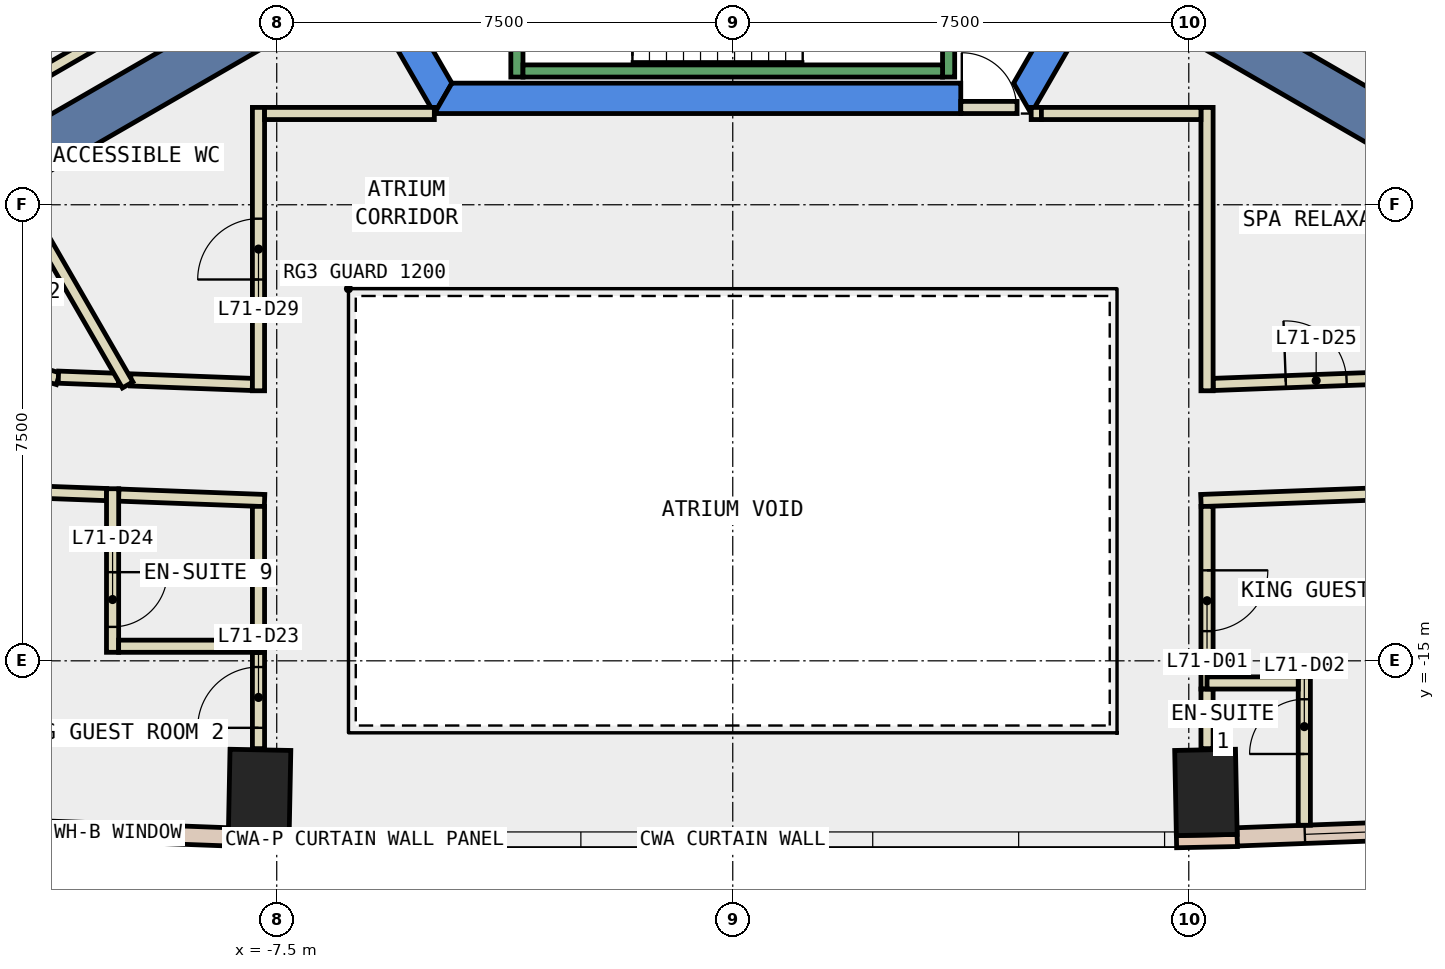
"""IFC4 building model, lengths in metres.
Left out: names, types, materials, properties, quantities, classifications, styles, units other than length and angle.
Written with IfcOpenShell. Run it as: python <this file> out.ifc"""

import sys

from ifc_helpers import new_model, si_unit, direction, frame, frame_2d, origin, origin_2d, place, context, subcontext, project, spatial, polyline, rectangle, outline, extrude, element, fill, save


model = new_model("IFC4")
c1 = context("Model", 3, precision=1e-05, world=origin(), true_north=direction((0.0, 1.0)))
c2 = subcontext(c1, "Body", "Model", "MODEL_VIEW")
j1 = project(units=[si_unit("LENGTHUNIT", "METRE"), si_unit("PLANEANGLEUNIT", "RADIAN")], contexts=[c1])
p1 = place(None, origin())
s1 = spatial("IfcSite", under=j1, at=p1, CompositionType="ELEMENT")
p2 = place(p1, origin())
s2 = spatial("IfcBuilding", under=s1, at=p2, CompositionType="ELEMENT")
p3 = place(p2, frame((0.0, 0.0, 304.4)))
s3 = spatial("IfcBuildingStorey", under=s2, at=p3, CompositionType="ELEMENT", Elevation=304.4)
for number, where, z_axis, x_axis in (
    (1, (-7.782, -17.164, -0.34), (0.0, 0.0, 1.0), (-1.0, 0.02, 0.0)),
    (2, (7.782, -17.164, -0.34), (0.0, 0.0, 1.0), (1.0, 0.02, 0.0)),
):
    element("IfcColumn", number, at=place(p3, frame(where, z_axis=z_axis, x_axis=x_axis)), inside=s3, PredefinedType="COLUMN", context=c2, shape_type="SweptSolid", body=[
        extrude(rectangle(XDim=1.0, YDim=1.4, at=origin_2d()), origin(), (0.0, 0.0, 1.0), 3.6),
    ])
p4 = place(p3, frame((0.0, 0.0, -0.34)))
e3 = element("IfcWall", 3, at=p4, inside=s3, PredefinedType="SHEAR", context=c2, shape_type="SweptSolid", body=[
    extrude(outline(polyline([(-9.815, 2.5), (-4.907, -6.0), (-4.619, -5.5), (-9.238, 2.5), (-9.815, 2.5)])), origin(), (0.0, 0.0, 1.0), 3.6),
])
p5 = place(p3, frame((0.0, 0.0, -0.34)))
e4 = element("IfcWall", 4, at=p5, inside=s3, PredefinedType="SHEAR", context=c2, shape_type="SweptSolid", body=[
    extrude(outline(polyline([(3.75, -6.0), (3.75, -5.5), (-4.619, -5.5), (-4.907, -6.0), (3.75, -6.0)])), origin(), (0.0, 0.0, 1.0), 3.6),
])
p6 = place(p3, frame((0.0, 0.0, -0.34)))
e5 = element("IfcWall", 5, at=p6, inside=s3, PredefinedType="SHEAR", context=c2, shape_type="SweptSolid", body=[
    extrude(outline(polyline([(4.907, -6.0), (9.815, 2.5), (9.238, 2.5), (4.619, -5.5), (4.907, -6.0)])), origin(), (0.0, 0.0, 1.0), 3.6),
])
for number, where, z_axis, x_axis in (
    (6, (6.279, -3.625, -0.34), (0.0, 0.0, 1.0), (0.866, -0.5, 0.0)),
    (7, (-6.279, -3.625, -0.34), (0.0, 0.0, 1.0), (-0.866, -0.5, 0.0)),
):
    element("IfcWall", number, at=place(p3, frame(where, z_axis=z_axis, x_axis=x_axis)), inside=s3, PredefinedType="SHEAR", context=c2, shape_type="SweptSolid", body=[
        extrude(rectangle(XDim=9.0, YDim=0.8, at=frame_2d((4.5, 0.0))), origin(), (0.0, 0.0, 1.0), 3.6),
    ])
for number, where, z_axis, x_axis in (
    (8, (-8.298, -17.954, 0.0), (0.0, 0.0, 1.0), (1.0, -0.02, 0.0)),
    (9, (7.298, -17.974, 0.0), (0.0, 0.0, 1.0), (1.0, 0.02, 0.0)),
):
    element("IfcWall", number, at=place(p3, frame(where, z_axis=z_axis, x_axis=x_axis)), inside=s3, PredefinedType="STANDARD", context=c2, shape_type="SweptSolid", body=[
        extrude(rectangle(XDim=1.0, YDim=0.2, at=frame_2d((0.5, 0.0))), origin(), (0.0, 0.0, 1.0), 3.26),
    ])
p7 = place(p3, frame((-11.92, -17.76, 0.0), z_axis=(0.0, 0.0, 1.0), x_axis=(0.999306787149, -0.037228284377, 0.0)))
e10 = element("IfcWall", 10, at=p7, inside=s3, PredefinedType="STANDARD", context=c2, shape_type="SweptSolid", body=[
    extrude(rectangle(XDim=3.626, YDim=0.3, at=frame_2d((1.813, 0.0))), origin(), (0.0, 0.0, 1.0), 3.26),
])
p8 = place(p7, frame((1.113, 0.0, 0.9)))
e11 = element("IfcOpeningElement", 11, at=p8, cuts=e10, PredefinedType="OPENING", context=c2, shape_type="SweptSolid", body=[
    extrude(rectangle(XDim=1.4, YDim=2.0, at=frame_2d((0.7, 1.0))), frame((0.0, 0.16, 0.0), z_axis=(0.0, -1.0, 0.0), x_axis=(1.0, 0.0, 0.0)), (0.0, 0.0, 1.0), 0.32),
])
p9 = place(p3, frame((8.296, -17.895, 0.0), z_axis=(0.0, 0.0, 1.0), x_axis=(0.999306787149, 0.037228284377, 0.0)))
e12 = element("IfcWall", 12, at=p9, inside=s3, PredefinedType="STANDARD", context=c2, shape_type="SweptSolid", body=[
    extrude(rectangle(XDim=3.626, YDim=0.3, at=frame_2d((1.813, 0.0))), origin(), (0.0, 0.0, 1.0), 3.26),
])
p10 = place(p9, frame((1.113, 0.0, 0.9)))
e13 = element("IfcOpeningElement", 13, at=p10, cuts=e12, PredefinedType="OPENING", context=c2, shape_type="SweptSolid", body=[
    extrude(rectangle(XDim=1.4, YDim=2.0, at=frame_2d((0.7, 1.0))), frame((0.0, 0.16, 0.0), z_axis=(0.0, -1.0, 0.0), x_axis=(1.0, 0.0, 0.0)), (0.0, 0.0, 1.0), 0.32),
])
p11 = place(p3, frame((7.9, -10.455, 0.0), z_axis=(0.0, 0.0, 1.0), x_axis=(0.999297278907, 0.037482640915, 0.0)))
e14 = element("IfcWall", 14, at=p11, inside=s3, PredefinedType="PARTITIONING", context=c2, shape_type="SweptSolid", body=[
    extrude(rectangle(XDim=3.394, YDim=0.2, at=frame_2d((1.697, 0.0))), origin(), (0.0, 0.0, 1.0), 3.26),
])
p12 = place(p11, frame((1.196, 0.0, 0.0)))
e15 = element("IfcOpeningElement", 15, at=p12, cuts=e14, PredefinedType="OPENING", context=c2, shape_type="SweptSolid", body=[
    extrude(rectangle(XDim=1.0, YDim=2.1, at=frame_2d((0.5, 1.05))), frame((0.0, 0.11, 0.0), z_axis=(0.0, -1.0, 0.0), x_axis=(1.0, 0.0, 0.0)), (0.0, 0.0, 1.0), 0.22),
])
p13 = place(p3, frame((-9.902, -10.38, 0.0), z_axis=(0.0, 0.0, 1.0), x_axis=(0.999295503749, -0.037529937222, 0.0)))
e16 = element("IfcWall", 16, at=p13, inside=s3, PredefinedType="PARTITIONING", context=c2, shape_type="SweptSolid", body=[
    extrude(rectangle(XDim=2.004, YDim=0.2, at=frame_2d((1.002, 0.0))), origin(), (0.0, 0.0, 1.0), 3.26),
])
p14 = place(p3, frame((-13.787, -9.55, 0.0), z_axis=(0.0, 0.0, 1.0), x_axis=(0.957493454064, -0.288454997225, 0.0)))
e17 = element("IfcWall", 17, at=p14, inside=s3, PredefinedType="PARTITIONING", context=c2, shape_type="SweptSolid", body=[
    extrude(rectangle(XDim=2.812, YDim=0.2, at=frame_2d((1.406, 0.0))), origin(), (0.0, 0.0, 1.0), 3.26),
])
p15 = place(p14, frame((0.906, 0.0, 0.0)))
e18 = element("IfcOpeningElement", 18, at=p15, cuts=e17, PredefinedType="OPENING", context=c2, shape_type="SweptSolid", body=[
    extrude(rectangle(XDim=1.0, YDim=2.1, at=frame_2d((0.5, 1.05))), frame((0.0, 0.11, 0.0), z_axis=(0.0, -1.0, 0.0), x_axis=(1.0, 0.0, 0.0)), (0.0, 0.0, 1.0), 0.22),
])
p16 = place(p3, frame((-11.091, -10.335, 0.0), z_axis=(0.0, 0.0, 1.0), x_axis=(0.999296807198, -0.037495214686, 0.0)))
e19 = element("IfcWall", 19, at=p16, inside=s3, PredefinedType="PARTITIONING", context=c2, shape_type="SweptSolid", body=[
    extrude(rectangle(XDim=0.99, YDim=0.2, at=frame_2d((0.495, 0.0))), origin(), (0.0, 0.0, 1.0), 3.26),
])
p17 = place(p3, frame((11.53, -12.22, 0.0), z_axis=(0.0, 0.0, 1.0), x_axis=(-0.999293554816, -0.037581794833, 0.0)))
e20 = element("IfcWall", 20, at=p17, inside=s3, PredefinedType="PARTITIONING", context=c2, shape_type="SweptSolid", body=[
    extrude(rectangle(XDim=3.833, YDim=0.2, at=frame_2d((1.917, 0.0))), origin(), (0.0, 0.0, 1.0), 3.26),
])
p18 = place(p3, frame((-10.299, -12.266, 0.0), z_axis=(0.0, 0.0, 1.0), x_axis=(-0.999313019426, 0.03706061529, 0.0)))
e21 = element("IfcWall", 21, at=p18, inside=s3, PredefinedType="PARTITIONING", context=c2, shape_type="SweptSolid", body=[
    extrude(rectangle(XDim=1.107, YDim=0.2, at=frame_2d((0.553, 0.0))), origin(), (0.0, 0.0, 1.0), 3.26),
])
p19 = place(p3, frame((-7.7, -12.364, 0.0), z_axis=(0.0, 0.0, 1.0), x_axis=(-0.999295758095, 0.037523164215, 0.0)))
e22 = element("IfcWall", 22, at=p19, inside=s3, PredefinedType="PARTITIONING", context=c2, shape_type="SweptSolid", body=[
    extrude(rectangle(XDim=2.401, YDim=0.2, at=frame_2d((1.2, 0.0))), origin(), (0.0, 0.0, 1.0), 3.26),
])
p20 = place(p3, frame((4.908, -5.999, 0.0), z_axis=(0.0, 0.0, 1.0), x_axis=(1.0, 0.0, 0.0)))
e23 = element("IfcWall", 23, at=p20, inside=s3, PredefinedType="PARTITIONING", context=c2, shape_type="SweptSolid", body=[
    extrude(rectangle(XDim=0.168, YDim=0.2, at=frame_2d((0.084, 0.0))), origin(), (0.0, 0.0, 1.0), 2.4),
])
p21 = place(p3, frame((7.8, -5.899, 0.0), z_axis=(0.0, 0.0, 1.0), x_axis=(0.0, -1.0, 0.0)))
e24 = element("IfcWall", 24, at=p21, inside=s3, PredefinedType="PARTITIONING", context=c2, shape_type="SweptSolid", body=[
    extrude(rectangle(XDim=4.66, YDim=0.2, at=frame_2d((2.33, 0.0))), origin(), (0.0, 0.0, 1.0), 3.26),
])
p22 = place(p3, frame((-7.8, -10.559, 0.0), z_axis=(0.0, 0.0, 1.0), x_axis=(0.0, 1.0, 0.0)))
e25 = element("IfcWall", 25, at=p22, inside=s3, PredefinedType="PARTITIONING", context=c2, shape_type="SweptSolid", body=[
    extrude(rectangle(XDim=4.66, YDim=0.2, at=frame_2d((2.33, 0.0))), origin(), (0.0, 0.0, 1.0), 3.26),
])
p23 = place(p22, frame((1.83, 0.0, 0.0)))
e26 = element("IfcOpeningElement", 26, at=p23, cuts=e25, PredefinedType="OPENING", context=c2, shape_type="SweptSolid", body=[
    extrude(rectangle(XDim=1.0, YDim=2.1, at=frame_2d((0.5, 1.05))), frame((0.0, 0.11, 0.0), z_axis=(0.0, -1.0, 0.0), x_axis=(1.0, 0.0, 0.0)), (0.0, 0.0, 1.0), 0.22),
])
p24 = place(p3, frame((-7.7, -5.999, 0.0), z_axis=(0.0, 0.0, 1.0), x_axis=(1.0, 0.0, 0.0)))
e27 = element("IfcWall", 27, at=p24, inside=s3, PredefinedType="PARTITIONING", context=c2, shape_type="SweptSolid", body=[
    extrude(rectangle(XDim=2.792, YDim=0.2, at=frame_2d((1.396, 0.0))), origin(), (0.0, 0.0, 1.0), 3.26),
])
p25 = place(p3, frame((7.8, -12.46, 0.0), z_axis=(0.0, 0.0, 1.0), x_axis=(0.0, -1.0, 0.0)))
e28 = element("IfcWall", 28, at=p25, inside=s3, PredefinedType="PARTITIONING", context=c2, shape_type="SweptSolid", body=[
    extrude(rectangle(XDim=3.004, YDim=0.2, at=frame_2d((1.502, 0.0))), origin(), (0.0, 0.0, 1.0), 3.26),
])
p26 = place(p25, frame((1.052, 0.0, 0.0)))
e29 = element("IfcOpeningElement", 29, at=p26, cuts=e28, PredefinedType="OPENING", context=c2, shape_type="SweptSolid", body=[
    extrude(rectangle(XDim=1.0, YDim=2.1, at=frame_2d((0.5, 1.05))), frame((0.0, 0.11, 0.0), z_axis=(0.0, -1.0, 0.0), x_axis=(1.0, 0.0, 0.0)), (0.0, 0.0, 1.0), 0.22),
])
p27 = place(p3, frame((7.8, -15.464, 0.0), z_axis=(0.0, 0.0, 1.0), x_axis=(0.0, -1.0, 0.0)))
e30 = element("IfcWall", 30, at=p27, inside=s3, PredefinedType="PARTITIONING", context=c2, shape_type="SweptSolid", body=[
    extrude(rectangle(XDim=0.98, YDim=0.2, at=frame_2d((0.49, 0.0))), origin(), (0.0, 0.0, 1.0), 3.26),
])
p28 = place(p3, frame((-7.8, -16.444, 0.0), z_axis=(0.0, 0.0, 1.0), x_axis=(0.0, 1.0, 0.0)))
e31 = element("IfcWall", 31, at=p28, inside=s3, PredefinedType="PARTITIONING", context=c2, shape_type="SweptSolid", body=[
    extrude(rectangle(XDim=1.584, YDim=0.2, at=frame_2d((0.792, 0.0))), origin(), (0.0, 0.0, 1.0), 3.26),
])
p29 = place(p28, frame((0.342, 0.0, 0.0)))
e32 = element("IfcOpeningElement", 32, at=p29, cuts=e31, PredefinedType="OPENING", context=c2, shape_type="SweptSolid", body=[
    extrude(rectangle(XDim=1.0, YDim=2.1, at=frame_2d((0.5, 1.05))), frame((0.0, 0.11, 0.0), z_axis=(0.0, -1.0, 0.0), x_axis=(1.0, 0.0, 0.0)), (0.0, 0.0, 1.0), 0.22),
])
p30 = place(p3, frame((-7.8, -14.86, 0.0), z_axis=(0.0, 0.0, 1.0), x_axis=(0.0, 1.0, 0.0)))
e33 = element("IfcWall", 33, at=p30, inside=s3, PredefinedType="PARTITIONING", context=c2, shape_type="SweptSolid", body=[
    extrude(rectangle(XDim=2.4, YDim=0.2, at=frame_2d((1.2, 0.0))), origin(), (0.0, 0.0, 1.0), 3.26),
])
p31 = place(p3, frame((6.835, -2.662, 0.0), z_axis=(0.0, 0.0, 1.0), x_axis=(0.866023427642, -0.500003422764, 0.0)))
e34 = element("IfcWall", 34, at=p31, inside=s3, PredefinedType="PARTITIONING", context=c2, shape_type="SweptSolid", body=[
    extrude(rectangle(XDim=8.65, YDim=0.1, at=frame_2d((4.325, 0.0))), origin(), (0.0, 0.0, 1.0), 3.26),
])
p32 = place(p3, frame((-6.804, -2.714, 0.0), z_axis=(0.0, 0.0, 1.0), x_axis=(-0.866057565063, -0.499944290893, 0.0)))
e35 = element("IfcWall", 35, at=p32, inside=s3, PredefinedType="PARTITIONING", context=c2, shape_type="SweptSolid", body=[
    extrude(rectangle(XDim=6.7, YDim=0.2, at=frame_2d((3.35, 0.0))), origin(), (0.0, 0.0, 1.0), 3.26),
])
p33 = place(p3, frame((-9.952, -10.463, 0.0), z_axis=(0.0, 0.0, 1.0), x_axis=(-0.499837150608, 0.866119404512, 0.0)))
e36 = element("IfcWall", 36, at=p33, inside=s3, PredefinedType="PARTITIONING", context=c2, shape_type="SweptSolid", body=[
    extrude(rectangle(XDim=3.685, YDim=0.2, at=frame_2d((1.843, 0.0))), origin(), (0.0, 0.0, 1.0), 3.26),
])
p34 = place(p3, frame((9.4, -17.704, 0.0), z_axis=(0.0, 0.0, 1.0), x_axis=(0.0, 1.0, 0.0)))
e37 = element("IfcWall", 37, at=p34, inside=s3, PredefinedType="PARTITIONING", context=c2, shape_type="SweptSolid", body=[
    extrude(rectangle(XDim=2.44, YDim=0.2, at=frame_2d((1.22, 0.0))), origin(), (0.0, 0.0, 1.0), 3.26),
])
p35 = place(p34, frame((1.172, 0.0, 0.0)))
e38 = element("IfcOpeningElement", 38, at=p35, cuts=e37, PredefinedType="OPENING", context=c2, shape_type="SweptSolid", body=[
    extrude(rectangle(XDim=0.9, YDim=2.1, at=frame_2d((0.45, 1.05))), frame((0.0, 0.11, 0.0), z_axis=(0.0, -1.0, 0.0), x_axis=(1.0, 0.0, 0.0)), (0.0, 0.0, 1.0), 0.22),
])
p36 = place(p3, frame((9.3, -15.364, 0.0), z_axis=(0.0, 0.0, 1.0), x_axis=(-1.0, 0.0, 0.0)))
e39 = element("IfcWall", 39, at=p36, inside=s3, PredefinedType="PARTITIONING", context=c2, shape_type="SweptSolid", body=[
    extrude(rectangle(XDim=1.5, YDim=0.2, at=frame_2d((0.75, 0.0))), origin(), (0.0, 0.0, 1.0), 3.26),
])
p37 = place(p3, frame((-10.199, -12.17, 0.0), z_axis=(0.0, 0.0, 1.0), x_axis=(-0.000363009324, -0.999999934112, 0.0)))
e40 = element("IfcWall", 40, at=p37, inside=s3, PredefinedType="PARTITIONING", context=c2, shape_type="SweptSolid", body=[
    extrude(rectangle(XDim=2.69, YDim=0.2, at=frame_2d((1.345, 0.0))), origin(), (0.0, 0.0, 1.0), 3.26),
])
p38 = place(p37, frame((1.372, 0.0, 0.0)))
e41 = element("IfcOpeningElement", 41, at=p38, cuts=e40, PredefinedType="OPENING", context=c2, shape_type="SweptSolid", body=[
    extrude(rectangle(XDim=0.9, YDim=2.1, at=frame_2d((0.45, 1.05))), frame((0.0, 0.11, 0.0), z_axis=(0.0, -1.0, 0.0), x_axis=(1.0, 0.0, 0.0)), (0.0, 0.0, 1.0), 0.22),
])
p39 = place(p3, frame((-10.1, -14.76, 0.0), z_axis=(0.0, 0.0, 1.0), x_axis=(1.0, 0.0, 0.0)))
e42 = element("IfcWall", 42, at=p39, inside=s3, PredefinedType="PARTITIONING", context=c2, shape_type="SweptSolid", body=[
    extrude(rectangle(XDim=2.3, YDim=0.2, at=frame_2d((1.15, 0.0))), origin(), (0.0, 0.0, 1.0), 3.26),
])
p40 = place(p3, frame((3.75, -5.9, 0.0), z_axis=(0.0, 0.0, 1.0), x_axis=(1.0, 0.0, 0.0)))
e43 = element("IfcWall", 43, at=p40, inside=s3, PredefinedType="PARTITIONING", context=c2, shape_type="SweptSolid", body=[
    extrude(rectangle(XDim=0.926, YDim=0.2, at=frame_2d((0.463, 0.0))), origin(), (0.0, 0.0, 1.0), 2.4),
])
p41 = place(p40, frame((0.017, 0.0, 0.0)))
e44 = element("IfcOpeningElement", 44, at=p41, cuts=e43, PredefinedType="OPENING", context=c2, shape_type="SweptSolid", body=[
    extrude(rectangle(XDim=0.9, YDim=2.1, at=frame_2d((0.45, 1.05))), frame((0.0, 0.11, 0.0), z_axis=(0.0, -1.0, 0.0), x_axis=(1.0, 0.0, 0.0)), (0.0, 0.0, 1.0), 0.22),
])
p42 = place(p3, frame((5.076, -5.999, 0.0), z_axis=(0.0, 0.0, 1.0), x_axis=(1.0, 0.0, 0.0)))
e45 = element("IfcWall", 45, at=p42, inside=s3, PredefinedType="PARTITIONING", context=c2, shape_type="SweptSolid", body=[
    extrude(rectangle(XDim=2.624, YDim=0.2, at=frame_2d((1.312, 0.0))), origin(), (0.0, 0.0, 1.0), 3.26),
])
p43 = place(p3, frame((-3.55, -1.0, 0.0), z_axis=(0.0, 0.0, 1.0), x_axis=(0.0, -1.0, 0.0)))
e46 = element("IfcWall", 46, at=p43, inside=s3, PredefinedType="STANDARD", context=c2, shape_type="SweptSolid", body=[
    extrude(rectangle(XDim=4.4, YDim=0.2, at=frame_2d((2.2, 0.0))), origin(), (0.0, 0.0, 1.0), 3.26),
])
p44 = place(p43, frame((2.4, 0.0, 0.0)))
e47 = element("IfcOpeningElement", 47, at=p44, cuts=e46, PredefinedType="OPENING", context=c2, shape_type="SweptSolid", body=[
    extrude(rectangle(XDim=1.1, YDim=2.2, at=frame_2d((0.55, 1.1))), frame((0.0, 0.11, 0.0), z_axis=(0.0, -1.0, 0.0), x_axis=(1.0, 0.0, 0.0)), (0.0, 0.0, 1.0), 0.22),
])
p45 = place(p3, frame((3.55, -2.667, 0.0), z_axis=(0.0, 0.0, 1.0), x_axis=(0.0, -1.0, 0.0)))
e48 = element("IfcWall", 48, at=p45, inside=s3, PredefinedType="STANDARD", context=c2, shape_type="SweptSolid", body=[
    extrude(rectangle(XDim=2.733, YDim=0.2, at=frame_2d((1.366, 0.0))), origin(), (0.0, 0.0, 1.0), 3.26),
])
p46 = place(p3, frame((-3.45, -5.3, 0.0), z_axis=(0.0, 0.0, 1.0), x_axis=(1.0, 0.0, 0.0)))
e49 = element("IfcWall", 49, at=p46, inside=s3, PredefinedType="STANDARD", context=c2, shape_type="SweptSolid", body=[
    extrude(rectangle(XDim=6.9, YDim=0.2, at=frame_2d((3.45, 0.0))), origin(), (0.0, 0.0, 1.0), 3.26),
])
p47 = place(p8, origin())
e50 = element("IfcWindow", 50, at=p47, inside=s3, PartitioningType="SINGLE_PANEL", PredefinedType="WINDOW", context=c2, shape_type="SweptSolid", body=[
    extrude(rectangle(XDim=1.4, YDim=2.0, at=frame_2d((0.7, 1.0))), frame((0.0, 0.03, 0.0), z_axis=(0.0, -1.0, 0.0), x_axis=(1.0, 0.0, 0.0)), (0.0, 0.0, 1.0), 0.06),
])
fill(e11, e50)
p48 = place(p10, origin())
e51 = element("IfcWindow", 51, at=p48, inside=s3, PartitioningType="SINGLE_PANEL", PredefinedType="WINDOW", context=c2, shape_type="SweptSolid", body=[
    extrude(rectangle(XDim=1.4, YDim=2.0, at=frame_2d((0.7, 1.0))), frame((0.0, 0.03, 0.0), z_axis=(0.0, -1.0, 0.0), x_axis=(1.0, 0.0, 0.0)), (0.0, 0.0, 1.0), 0.06),
])
fill(e13, e51)
p49 = place(p26, origin())
e52 = element("IfcDoor", 52, at=p49, inside=s3, OperationType="SINGLE_SWING_RIGHT", PredefinedType="DOOR", context=c2, shape_type="SweptSolid", body=[
    extrude(rectangle(XDim=1.0, YDim=2.1, at=frame_2d((0.5, 1.05))), frame((0.0, 0.025, 0.0), z_axis=(0.0, -1.0, 0.0), x_axis=(1.0, 0.0, 0.0)), (0.0, 0.0, 1.0), 0.05),
])
fill(e29, e52)
p50 = place(p35, origin())
e53 = element("IfcDoor", 53, at=p50, inside=s3, OperationType="SINGLE_SWING_RIGHT", PredefinedType="DOOR", context=c2, shape_type="SweptSolid", body=[
    extrude(rectangle(XDim=0.9, YDim=2.1, at=frame_2d((0.45, 1.05))), frame((0.0, 0.025, 0.0), z_axis=(0.0, -1.0, 0.0), x_axis=(1.0, 0.0, 0.0)), (0.0, 0.0, 1.0), 0.05),
])
fill(e38, e53)
p51 = place(p29, origin())
e54 = element("IfcDoor", 54, at=p51, inside=s3, OperationType="SINGLE_SWING_RIGHT", PredefinedType="DOOR", context=c2, shape_type="SweptSolid", body=[
    extrude(rectangle(XDim=1.0, YDim=2.1, at=frame_2d((0.5, 1.05))), frame((0.0, 0.025, 0.0), z_axis=(0.0, -1.0, 0.0), x_axis=(1.0, 0.0, 0.0)), (0.0, 0.0, 1.0), 0.05),
])
fill(e32, e54)
p52 = place(p38, origin())
e55 = element("IfcDoor", 55, at=p52, inside=s3, OperationType="SINGLE_SWING_RIGHT", PredefinedType="DOOR", context=c2, shape_type="SweptSolid", body=[
    extrude(rectangle(XDim=0.9, YDim=2.1, at=frame_2d((0.45, 1.05))), frame((0.0, 0.025, 0.0), z_axis=(0.0, -1.0, 0.0), x_axis=(1.0, 0.0, 0.0)), (0.0, 0.0, 1.0), 0.05),
])
fill(e41, e55)
p53 = place(p12, origin())
e56 = element("IfcDoor", 56, at=p53, inside=s3, OperationType="SINGLE_SWING_LEFT", PredefinedType="DOOR", context=c2, shape_type="SweptSolid", body=[
    extrude(rectangle(XDim=1.0, YDim=2.1, at=frame_2d((0.5, 1.05))), frame((0.0, 0.025, 0.0), z_axis=(0.0, -1.0, 0.0), x_axis=(1.0, 0.0, 0.0)), (0.0, 0.0, 1.0), 0.05),
])
fill(e15, e56)
p54 = place(p23, origin())
e57 = element("IfcDoor", 57, at=p54, inside=s3, OperationType="SINGLE_SWING_LEFT", PredefinedType="DOOR", context=c2, shape_type="SweptSolid", body=[
    extrude(rectangle(XDim=1.0, YDim=2.1, at=frame_2d((0.5, 1.05))), frame((0.0, 0.025, 0.0), z_axis=(0.0, -1.0, 0.0), x_axis=(1.0, 0.0, 0.0)), (0.0, 0.0, 1.0), 0.05),
])
fill(e26, e57)
p55 = place(p41, origin())
e58 = element("IfcDoor", 58, at=p55, inside=s3, OperationType="SINGLE_SWING_LEFT", PredefinedType="DOOR", context=c2, shape_type="SweptSolid", body=[
    extrude(rectangle(XDim=0.9, YDim=2.1, at=frame_2d((0.45, 1.05))), frame((0.0, 0.025, 0.0), z_axis=(0.0, -1.0, 0.0), x_axis=(1.0, 0.0, 0.0)), (0.0, 0.0, 1.0), 0.05),
])
fill(e44, e58)
save(model, sys.argv[1])
